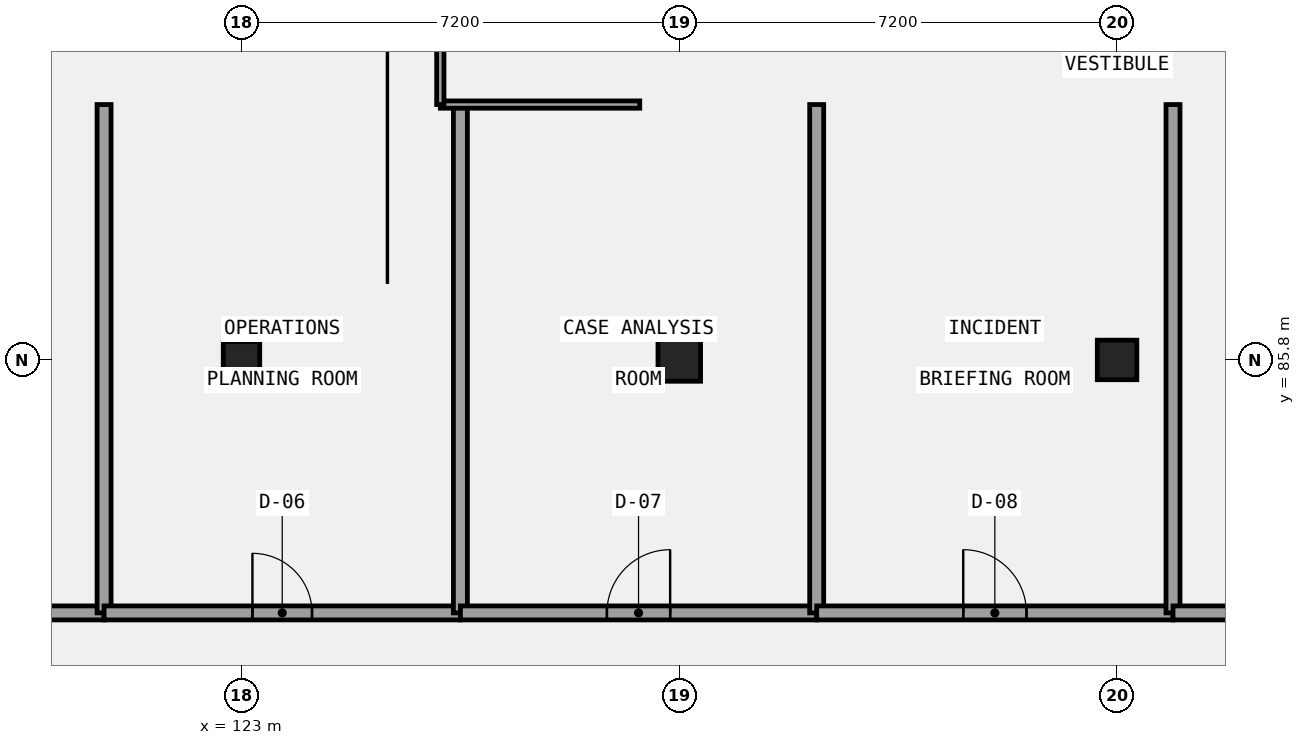
"""IFC4 building model, lengths in metres.
Left out: names, types, materials, properties, quantities, classifications, styles, units other than length and angle.
Written with IfcOpenShell. Run it as: python <this file> out.ifc"""

import sys

from ifc_helpers import new_model, si_unit, direction, frame, frame_2d, origin, origin_2d, place, context, subcontext, project, spatial, rectangle, extrude, element, fill, save


model = new_model("IFC4")
c1 = context("Model", 3, precision=1e-05, world=origin(), true_north=direction((0.0, 1.0)))
c2 = subcontext(c1, "Body", "Model", "MODEL_VIEW")
j1 = project(units=[si_unit("LENGTHUNIT", "METRE"), si_unit("PLANEANGLEUNIT", "RADIAN")], contexts=[c1])
p1 = place(None, origin())
s1 = spatial("IfcSite", under=j1, at=p1, CompositionType="ELEMENT")
p2 = place(p1, origin())
s2 = spatial("IfcBuilding", under=s1, at=p2, CompositionType="ELEMENT")
p3 = place(p2, frame((0.0, 0.0, 9.6)))
s3 = spatial("IfcBuildingStorey", under=s2, at=p3, CompositionType="ELEMENT", Elevation=9.6)
p4 = place(p3, frame((123.0, 85.8, 0.0), z_axis=(0.0, 0.0, 1.0), x_axis=(1.0, 0.0, 0.0)))
e1 = element("IfcColumn", 1, at=p4, inside=s3, PredefinedType="COLUMN", context=c2, shape_type="SweptSolid", body=[
    extrude(rectangle(XDim=0.6, YDim=0.6, at=origin_2d()), origin(), (0.0, 0.0, 1.0), 4.2),
])
p5 = place(p3, frame((130.2, 85.8, 0.0), z_axis=(0.0, 0.0, 1.0), x_axis=(1.0, 0.0, 0.0)))
e2 = element("IfcColumn", 2, at=p5, inside=s3, PredefinedType="COLUMN", context=c2, shape_type="SweptSolid", body=[
    extrude(rectangle(XDim=0.7, YDim=0.7, at=origin_2d()), origin(), (0.0, 0.0, 1.0), 4.2),
])
p6 = place(p3, frame((137.4, 85.8, 0.0), z_axis=(0.0, 0.0, 1.0), x_axis=(1.0, 0.0, 0.0)))
e3 = element("IfcColumn", 3, at=p6, inside=s3, PredefinedType="COLUMN", context=c2, shape_type="SweptSolid", body=[
    extrude(rectangle(XDim=0.65, YDim=0.65, at=origin_2d()), origin(), (0.0, 0.0, 1.0), 4.2),
])
p7 = place(p3, frame((114.88, 81.64, 0.0), z_axis=(0.0, 0.0, 1.0), x_axis=(1.0, 0.0, 0.0)))
e4 = element("IfcWall", 4, at=p7, inside=s3, PredefinedType="PARTITIONING", context=c2, shape_type="SweptSolid", body=[
    extrude(rectangle(XDim=5.86, YDim=0.23, at=frame_2d((2.93, 0.0))), origin(), (0.0, 0.0, 1.0), 3.94),
])
p8 = place(p7, frame((2.44, 0.0, 0.0)))
e5 = element("IfcOpeningElement", 5, at=p8, cuts=e4, PredefinedType="OPENING", context=c2, shape_type="SweptSolid", body=[
    extrude(rectangle(XDim=0.98, YDim=2.22, at=frame_2d((0.49, 1.11))), frame((0.0, 0.125, 0.0), z_axis=(0.0, -1.0, 0.0), x_axis=(1.0, 0.0, 0.0)), (0.0, 0.0, 1.0), 0.25),
])
p9 = place(p3, frame((120.74, 81.64, 0.0), z_axis=(0.0, 0.0, 1.0), x_axis=(0.0, 1.0, 0.0)))
e6 = element("IfcWall", 6, at=p9, inside=s3, PredefinedType="PARTITIONING", context=c2, shape_type="SweptSolid", body=[
    extrude(rectangle(XDim=8.36, YDim=0.23, at=frame_2d((4.18, 0.0))), origin(), (0.0, 0.0, 1.0), 3.94),
])
p10 = place(p3, frame((120.74, 81.64, 0.0), z_axis=(0.0, 0.0, 1.0), x_axis=(1.0, 0.0, 0.0)))
e7 = element("IfcWall", 7, at=p10, inside=s3, PredefinedType="PARTITIONING", context=c2, shape_type="SweptSolid", body=[
    extrude(rectangle(XDim=5.86, YDim=0.23, at=frame_2d((2.93, 0.0))), origin(), (0.0, 0.0, 1.0), 3.94),
])
p11 = place(p10, frame((2.44, 0.0, 0.0)))
e8 = element("IfcOpeningElement", 8, at=p11, cuts=e7, PredefinedType="OPENING", context=c2, shape_type="SweptSolid", body=[
    extrude(rectangle(XDim=0.98, YDim=2.35, at=frame_2d((0.49, 1.175))), frame((0.0, 0.125, 0.0), z_axis=(0.0, -1.0, 0.0), x_axis=(1.0, 0.0, 0.0)), (0.0, 0.0, 1.0), 0.25),
])
p12 = place(p3, frame((126.6, 81.64, 0.0), z_axis=(0.0, 0.0, 1.0), x_axis=(0.0, 1.0, 0.0)))
e9 = element("IfcWall", 9, at=p12, inside=s3, PredefinedType="PARTITIONING", context=c2, shape_type="SweptSolid", body=[
    extrude(rectangle(XDim=8.36, YDim=0.23, at=frame_2d((4.18, 0.0))), origin(), (0.0, 0.0, 1.0), 3.94),
])
p13 = place(p3, frame((126.6, 81.64, 0.0), z_axis=(0.0, 0.0, 1.0), x_axis=(1.0, 0.0, 0.0)))
e10 = element("IfcWall", 10, at=p13, inside=s3, PredefinedType="PARTITIONING", context=c2, shape_type="SweptSolid", body=[
    extrude(rectangle(XDim=5.86, YDim=0.23, at=frame_2d((2.93, 0.0))), origin(), (0.0, 0.0, 1.0), 3.94),
])
p14 = place(p13, frame((2.41, 0.0, 0.0)))
e11 = element("IfcOpeningElement", 11, at=p14, cuts=e10, PredefinedType="OPENING", context=c2, shape_type="SweptSolid", body=[
    extrude(rectangle(XDim=1.04, YDim=2.1, at=frame_2d((0.52, 1.05))), frame((0.0, 0.125, 0.0), z_axis=(0.0, -1.0, 0.0), x_axis=(1.0, 0.0, 0.0)), (0.0, 0.0, 1.0), 0.25),
])
p15 = place(p3, frame((132.46, 81.64, 0.0), z_axis=(0.0, 0.0, 1.0), x_axis=(0.0, 1.0, 0.0)))
e12 = element("IfcWall", 12, at=p15, inside=s3, PredefinedType="PARTITIONING", context=c2, shape_type="SweptSolid", body=[
    extrude(rectangle(XDim=8.36, YDim=0.23, at=frame_2d((4.18, 0.0))), origin(), (0.0, 0.0, 1.0), 3.94),
])
p16 = place(p3, frame((132.46, 81.64, 0.0), z_axis=(0.0, 0.0, 1.0), x_axis=(1.0, 0.0, 0.0)))
e13 = element("IfcWall", 13, at=p16, inside=s3, PredefinedType="PARTITIONING", context=c2, shape_type="SweptSolid", body=[
    extrude(rectangle(XDim=5.86, YDim=0.23, at=frame_2d((2.93, 0.0))), origin(), (0.0, 0.0, 1.0), 3.94),
])
p17 = place(p16, frame((2.41, 0.0, 0.0)))
e14 = element("IfcOpeningElement", 14, at=p17, cuts=e13, PredefinedType="OPENING", context=c2, shape_type="SweptSolid", body=[
    extrude(rectangle(XDim=1.04, YDim=2.22, at=frame_2d((0.52, 1.11))), frame((0.0, 0.125, 0.0), z_axis=(0.0, -1.0, 0.0), x_axis=(1.0, 0.0, 0.0)), (0.0, 0.0, 1.0), 0.25),
])
p18 = place(p3, frame((138.32, 81.64, 0.0), z_axis=(0.0, 0.0, 1.0), x_axis=(0.0, 1.0, 0.0)))
e15 = element("IfcWall", 15, at=p18, inside=s3, PredefinedType="PARTITIONING", context=c2, shape_type="SweptSolid", body=[
    extrude(rectangle(XDim=8.36, YDim=0.23, at=frame_2d((4.18, 0.0))), origin(), (0.0, 0.0, 1.0), 3.94),
])
p19 = place(p3, frame((138.32, 81.64, 0.0), z_axis=(0.0, 0.0, 1.0), x_axis=(1.0, 0.0, 0.0)))
e16 = element("IfcWall", 16, at=p19, inside=s3, PredefinedType="PARTITIONING", context=c2, shape_type="SweptSolid", body=[
    extrude(rectangle(XDim=5.86, YDim=0.23, at=frame_2d((2.93, 0.0))), origin(), (0.0, 0.0, 1.0), 3.94),
])
p20 = place(p19, frame((2.41, 0.0, 0.0)))
e17 = element("IfcOpeningElement", 17, at=p20, cuts=e16, PredefinedType="OPENING", context=c2, shape_type="SweptSolid", body=[
    extrude(rectangle(XDim=1.04, YDim=2.35, at=frame_2d((0.52, 1.175))), frame((0.0, 0.125, 0.0), z_axis=(0.0, -1.0, 0.0), x_axis=(1.0, 0.0, 0.0)), (0.0, 0.0, 1.0), 0.25),
])
p21 = place(p3, frame((126.27, 90.0, 0.0), z_axis=(0.0, 0.0, 1.0), x_axis=(1.0, 0.0, 0.0)))
e18 = element("IfcWall", 18, at=p21, inside=s3, PredefinedType="PARTITIONING", context=c2, shape_type="SweptSolid", body=[
    extrude(rectangle(XDim=3.28, YDim=0.12, at=frame_2d((1.64, 0.0))), origin(), (0.0, 0.0, 1.0), 3.94),
])
p22 = place(p3, frame((126.27, 90.0, 0.0), z_axis=(0.0, 0.0, 1.0), x_axis=(0.0, 1.0, 0.0)))
e19 = element("IfcWall", 19, at=p22, inside=s3, PredefinedType="PARTITIONING", context=c2, shape_type="SweptSolid", body=[
    extrude(rectangle(XDim=5.425, YDim=0.12, at=frame_2d((2.712, 0.0))), origin(), (0.0, 0.0, 1.0), 3.94),
])
p23 = place(p22, frame((2.163, 0.0, 0.0)))
e20 = element("IfcOpeningElement", 20, at=p23, cuts=e19, PredefinedType="OPENING", context=c2, shape_type="SweptSolid", body=[
    extrude(rectangle(XDim=1.1, YDim=2.1, at=frame_2d((0.55, 1.05))), frame((0.0, 0.07, 0.0), z_axis=(0.0, -1.0, 0.0), x_axis=(1.0, 0.0, 0.0)), (0.0, 0.0, 1.0), 0.14),
])
p24 = place(p11, origin())
e21 = element("IfcDoor", 21, at=p24, inside=s3, OperationType="SINGLE_SWING_LEFT", PredefinedType="DOOR", context=c2, shape_type="SweptSolid", body=[
    extrude(rectangle(XDim=0.98, YDim=2.35, at=frame_2d((0.49, 1.175))), frame((0.0, 0.025, 0.0), z_axis=(0.0, -1.0, 0.0), x_axis=(1.0, 0.0, 0.0)), (0.0, 0.0, 1.0), 0.05),
])
fill(e8, e21)
p25 = place(p14, origin())
e22 = element("IfcDoor", 22, at=p25, inside=s3, OperationType="SINGLE_SWING_RIGHT", PredefinedType="DOOR", context=c2, shape_type="SweptSolid", body=[
    extrude(rectangle(XDim=1.04, YDim=2.1, at=frame_2d((0.52, 1.05))), frame((0.0, 0.025, 0.0), z_axis=(0.0, -1.0, 0.0), x_axis=(1.0, 0.0, 0.0)), (0.0, 0.0, 1.0), 0.05),
])
fill(e11, e22)
p26 = place(p17, origin())
e23 = element("IfcDoor", 23, at=p26, inside=s3, OperationType="SINGLE_SWING_LEFT", PredefinedType="DOOR", context=c2, shape_type="SweptSolid", body=[
    extrude(rectangle(XDim=1.04, YDim=2.22, at=frame_2d((0.52, 1.11))), frame((0.0, 0.025, 0.0), z_axis=(0.0, -1.0, 0.0), x_axis=(1.0, 0.0, 0.0)), (0.0, 0.0, 1.0), 0.05),
])
fill(e14, e23)
save(model, sys.argv[1])
